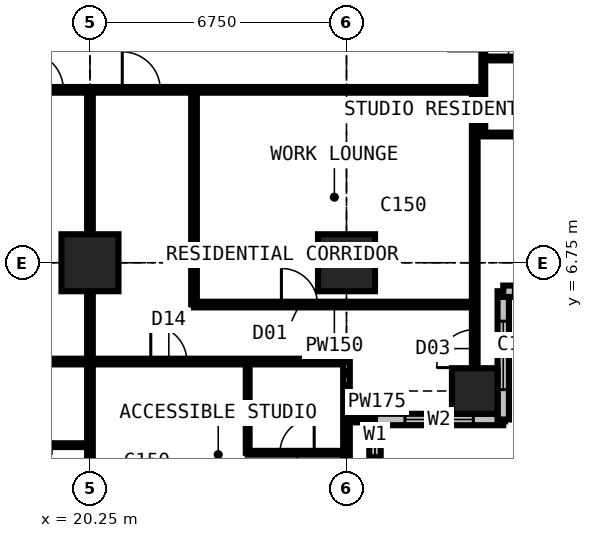
"""IFC4 building model, lengths in metres.
Left out: names, types, materials, properties, quantities, classifications, styles, units other than length and angle.
Written with IfcOpenShell. Run it as: python <this file> out.ifc"""

import sys

from ifc_helpers import new_model, si_unit, direction, frame, frame_2d, origin, origin_2d, place, context, subcontext, project, spatial, rectangle, extrude, element, fill, save


model = new_model("IFC4")
c1 = context("Model", 3, precision=1e-05, world=origin(), true_north=direction((0.0, 1.0)))
c2 = subcontext(c1, "Body", "Model", "MODEL_VIEW")
j1 = project(units=[si_unit("LENGTHUNIT", "METRE"), si_unit("PLANEANGLEUNIT", "RADIAN")], contexts=[c1])
p1 = place(None, origin())
s1 = spatial("IfcSite", under=j1, at=p1, CompositionType="ELEMENT")
p2 = place(p1, origin())
s2 = spatial("IfcBuilding", under=s1, at=p2, CompositionType="ELEMENT")
p3 = place(p2, frame((0.0, 0.0, 149.4)))
s3 = spatial("IfcBuildingStorey", under=s2, at=p3, CompositionType="ELEMENT", Elevation=149.4)
for number, where, z_axis, x_axis in (
    (1, (20.25, 6.75, 0.0), (0.0, 0.0, 1.0), (1.0, 0.0, 0.0)),
    (2, (27.0, 6.75, 0.0), (0.0, 0.0, 1.0), (1.0, 0.0, 0.0)),
):
    element("IfcColumn", number, at=place(p3, frame(where, z_axis=z_axis, x_axis=x_axis)), inside=s3, PredefinedType="COLUMN", context=c2, shape_type="SweptSolid", body=[
        extrude(rectangle(XDim=1.5, YDim=1.5, at=origin_2d()), origin(), (0.0, 0.0, 1.0), 3.6),
    ])
p4 = place(p3, frame((30.375, 3.375, 0.0), z_axis=(0.0, 0.0, 1.0), x_axis=(1.0, 0.0, 0.0)))
e3 = element("IfcColumn", 3, at=p4, inside=s3, PredefinedType="COLUMN", context=c2, shape_type="SweptSolid", body=[
    extrude(rectangle(XDim=1.2, YDim=1.2, at=origin_2d()), origin(), (0.0, 0.0, 1.0), 3.6),
])
p5 = place(p3, frame((27.75, -0.75, 0.0), z_axis=(0.0, 0.0, 1.0), x_axis=(0.0, 1.0, 0.0)))
e4 = element("IfcWall", 4, at=p5, inside=s3, PredefinedType="SOLIDWALL", context=c2, shape_type="SweptSolid", body=[
    extrude(rectangle(XDim=3.375, YDim=0.3, at=frame_2d((1.688, 0.0))), origin(), (0.0, 0.0, 1.0), 3.375),
])
p6 = place(p5, frame((1.607, 0.0, 0.9)))
e5 = element("IfcOpeningElement", 5, at=p6, cuts=e4, PredefinedType="OPENING", context=c2, shape_type="SweptSolid", body=[
    extrude(rectangle(XDim=1.5, YDim=1.8, at=frame_2d((0.75, 0.9))), frame((0.0, 0.16, 0.0), z_axis=(0.0, -1.0, 0.0), x_axis=(1.0, 0.0, 0.0)), (0.0, 0.0, 1.0), 0.32),
])
p7 = place(p3, frame((27.75, 2.625, 0.0), z_axis=(0.0, 0.0, 1.0), x_axis=(1.0, 0.0, 0.0)))
e6 = element("IfcWall", 6, at=p7, inside=s3, PredefinedType="SOLIDWALL", context=c2, shape_type="SweptSolid", body=[
    extrude(rectangle(XDim=3.375, YDim=0.3, at=frame_2d((1.688, 0.0))), origin(), (0.0, 0.0, 1.0), 3.375),
])
p8 = place(p7, frame((0.788, 0.0, 0.6)))
e7 = element("IfcOpeningElement", 7, at=p8, cuts=e6, PredefinedType="OPENING", context=c2, shape_type="SweptSolid", body=[
    extrude(rectangle(XDim=1.8, YDim=2.1, at=frame_2d((0.9, 1.05))), frame((0.0, 0.16, 0.0), z_axis=(0.0, -1.0, 0.0), x_axis=(1.0, 0.0, 0.0)), (0.0, 0.0, 1.0), 0.32),
])
p9 = place(p3, frame((31.125, 2.625, 0.0), z_axis=(0.0, 0.0, 1.0), x_axis=(0.0, 1.0, 0.0)))
e8 = element("IfcWall", 8, at=p9, inside=s3, PredefinedType="SOLIDWALL", context=c2, shape_type="SweptSolid", body=[
    extrude(rectangle(XDim=3.375, YDim=0.3, at=frame_2d((1.688, 0.0))), origin(), (0.0, 0.0, 1.0), 3.375),
])
p10 = place(p9, frame((0.788, 0.0, 0.6)))
e9 = element("IfcOpeningElement", 9, at=p10, cuts=e8, PredefinedType="OPENING", context=c2, shape_type="SweptSolid", body=[
    extrude(rectangle(XDim=1.8, YDim=2.1, at=frame_2d((0.9, 1.05))), frame((0.0, 0.16, 0.0), z_axis=(0.0, -1.0, 0.0), x_axis=(1.0, 0.0, 0.0)), (0.0, 0.0, 1.0), 0.32),
])
p11 = place(p3, frame((31.125, 6.0, 0.0), z_axis=(0.0, 0.0, 1.0), x_axis=(1.0, 0.0, 0.0)))
e10 = element("IfcWall", 10, at=p11, inside=s3, PredefinedType="SOLIDWALL", context=c2, shape_type="SweptSolid", body=[
    extrude(rectangle(XDim=3.375, YDim=0.3, at=frame_2d((1.688, 0.0))), origin(), (0.0, 0.0, 1.0), 3.375),
])
p12 = place(p11, frame((0.268, 0.0, 0.9)))
e11 = element("IfcOpeningElement", 11, at=p12, cuts=e10, PredefinedType="OPENING", context=c2, shape_type="SweptSolid", body=[
    extrude(rectangle(XDim=1.5, YDim=1.8, at=frame_2d((0.75, 0.9))), frame((0.0, 0.16, 0.0), z_axis=(0.0, -1.0, 0.0), x_axis=(1.0, 0.0, 0.0)), (0.0, 0.0, 1.0), 0.32),
])
p13 = place(p3, frame((6.75, 4.15, 0.0), z_axis=(0.0, 0.0, 1.0), x_axis=(1.0, 0.0, 0.0)))
e12 = element("IfcWall", 12, at=p13, inside=s3, PredefinedType="PARTITIONING", context=c2, shape_type="SweptSolid", body=[
    extrude(rectangle(XDim=20.25, YDim=0.15, at=frame_2d((10.125, 0.0))), origin(), (0.0, 0.0, 1.0), 3.375),
])
p14 = place(p13, frame((1.2, 0.0, 0.0)))
e13 = element("IfcOpeningElement", 13, at=p14, cuts=e12, PredefinedType="OPENING", context=c2, shape_type="SweptSolid", body=[
    extrude(rectangle(XDim=1.0, YDim=2.2, at=frame_2d((0.5, 1.1))), frame((0.0, 0.085, 0.0), z_axis=(0.0, -1.0, 0.0), x_axis=(1.0, 0.0, 0.0)), (0.0, 0.0, 1.0), 0.17),
])
p15 = place(p13, frame((3.575, 0.0, 0.0)))
e14 = element("IfcOpeningElement", 14, at=p15, cuts=e12, PredefinedType="OPENING", context=c2, shape_type="SweptSolid", body=[
    extrude(rectangle(XDim=0.95, YDim=2.2, at=frame_2d((0.475, 1.1))), frame((0.0, 0.085, 0.0), z_axis=(0.0, -1.0, 0.0), x_axis=(1.0, 0.0, 0.0)), (0.0, 0.0, 1.0), 0.17),
])
p16 = place(p13, frame((7.0, 0.0, 0.0)))
e15 = element("IfcOpeningElement", 15, at=p16, cuts=e12, PredefinedType="OPENING", context=c2, shape_type="SweptSolid", body=[
    extrude(rectangle(XDim=0.95, YDim=2.2, at=frame_2d((0.475, 1.1))), frame((0.0, 0.085, 0.0), z_axis=(0.0, -1.0, 0.0), x_axis=(1.0, 0.0, 0.0)), (0.0, 0.0, 1.0), 0.17),
])
p17 = place(p13, frame((10.375, 0.0, 0.0)))
e16 = element("IfcOpeningElement", 16, at=p17, cuts=e12, PredefinedType="OPENING", context=c2, shape_type="SweptSolid", body=[
    extrude(rectangle(XDim=0.95, YDim=2.2, at=frame_2d((0.475, 1.1))), frame((0.0, 0.085, 0.0), z_axis=(0.0, -1.0, 0.0), x_axis=(1.0, 0.0, 0.0)), (0.0, 0.0, 1.0), 0.17),
])
p18 = place(p13, frame((15.1, 0.0, 0.0)))
e17 = element("IfcOpeningElement", 17, at=p18, cuts=e12, PredefinedType="OPENING", context=c2, shape_type="SweptSolid", body=[
    extrude(rectangle(XDim=0.95, YDim=2.2, at=frame_2d((0.475, 1.1))), frame((0.0, 0.085, 0.0), z_axis=(0.0, -1.0, 0.0), x_axis=(1.0, 0.0, 0.0)), (0.0, 0.0, 1.0), 0.17),
])
p19 = place(p3, frame((10.125, 11.3, 0.0), z_axis=(0.0, 0.0, 1.0), x_axis=(1.0, 0.0, 0.0)))
e18 = element("IfcWall", 18, at=p19, inside=s3, PredefinedType="PARTITIONING", context=c2, shape_type="SweptSolid", body=[
    extrude(rectangle(XDim=20.475, YDim=0.15, at=frame_2d((10.238, 0.0))), origin(), (0.0, 0.0, 1.0), 3.375),
])
p20 = place(p19, frame((8.425, 0.0, 0.0)))
e19 = element("IfcOpeningElement", 19, at=p20, cuts=e18, PredefinedType="OPENING", context=c2, shape_type="SweptSolid", body=[
    extrude(rectangle(XDim=1.0, YDim=2.2, at=frame_2d((0.5, 1.1))), frame((0.0, 0.085, 0.0), z_axis=(0.0, -1.0, 0.0), x_axis=(1.0, 0.0, 0.0)), (0.0, 0.0, 1.0), 0.17),
])
p21 = place(p19, frame((10.975, 0.0, 0.0)))
e20 = element("IfcOpeningElement", 20, at=p21, cuts=e18, PredefinedType="OPENING", context=c2, shape_type="SweptSolid", body=[
    extrude(rectangle(XDim=1.0, YDim=2.2, at=frame_2d((0.5, 1.1))), frame((0.0, 0.085, 0.0), z_axis=(0.0, -1.0, 0.0), x_axis=(1.0, 0.0, 0.0)), (0.0, 0.0, 1.0), 0.17),
])
p22 = place(p19, frame((4.875, 0.0, 0.0)))
e21 = element("IfcOpeningElement", 21, at=p22, cuts=e18, PredefinedType="OPENING", context=c2, shape_type="SweptSolid", body=[
    extrude(rectangle(XDim=0.95, YDim=2.2, at=frame_2d((0.475, 1.1))), frame((0.0, 0.085, 0.0), z_axis=(0.0, -1.0, 0.0), x_axis=(1.0, 0.0, 0.0)), (0.0, 0.0, 1.0), 0.17),
])
p23 = place(p3, frame((18.25, 1.95, 0.0), z_axis=(0.0, 0.0, 1.0), x_axis=(1.0, 0.0, 0.0)))
e22 = element("IfcWall", 22, at=p23, inside=s3, PredefinedType="PARTITIONING", context=c2, shape_type="SweptSolid", body=[
    extrude(rectangle(XDim=2.0, YDim=0.1, at=frame_2d((1.0, 0.0))), origin(), (0.0, 0.0, 1.0), 3.375),
])
p24 = place(p3, frame((20.25, -0.734, 0.0), z_axis=(0.0, 0.0, 1.0), x_axis=(0.0, 1.0, 0.0)))
e23 = element("IfcWall", 23, at=p24, inside=s3, PredefinedType="PARTITIONING", context=c2, shape_type="SweptSolid", body=[
    extrude(rectangle(XDim=12.034, YDim=0.15, at=frame_2d((6.017, 0.0))), origin(), (0.0, 0.0, 1.0), 2.806),
])
p25 = place(p3, frame((22.988, 5.65, 0.0), z_axis=(0.0, 0.0, 1.0), x_axis=(1.0, 0.0, 0.0)))
e24 = element("IfcWall", 24, at=p25, inside=s3, PredefinedType="PARTITIONING", context=c2, shape_type="SweptSolid", body=[
    extrude(rectangle(XDim=7.387, YDim=0.15, at=frame_2d((3.694, 0.0))), origin(), (0.0, 0.0, 1.0), 3.375),
])
p26 = place(p25, frame((2.3, 0.0, 0.0)))
e25 = element("IfcOpeningElement", 25, at=p26, cuts=e24, PredefinedType="OPENING", context=c2, shape_type="SweptSolid", body=[
    extrude(rectangle(XDim=0.95, YDim=2.2, at=frame_2d((0.475, 1.1))), frame((0.0, 0.085, 0.0), z_axis=(0.0, -1.0, 0.0), x_axis=(1.0, 0.0, 0.0)), (0.0, 0.0, 1.0), 0.17),
])
p27 = place(p3, frame((22.988, 5.65, 0.0), z_axis=(0.0, 0.0, 1.0), x_axis=(0.0, 1.0, 0.0)))
e26 = element("IfcWall", 26, at=p27, inside=s3, PredefinedType="PARTITIONING", context=c2, shape_type="SweptSolid", body=[
    extrude(rectangle(XDim=5.65, YDim=0.15, at=frame_2d((2.825, 0.0))), origin(), (0.0, 0.0, 1.0), 3.375),
])
p28 = place(p3, frame((24.4, 1.75, 0.0), z_axis=(0.0, 0.0, 1.0), x_axis=(0.0, 1.0, 0.0)))
e27 = element("IfcWall", 27, at=p28, inside=s3, PredefinedType="PARTITIONING", context=c2, shape_type="SweptSolid", body=[
    extrude(rectangle(XDim=2.4, YDim=0.1, at=frame_2d((1.2, 0.0))), origin(), (0.0, 0.0, 1.0), 3.375),
])
p29 = place(p3, frame((24.4, 1.75, 0.0), z_axis=(0.0, 0.0, 1.0), x_axis=(1.0, 0.0, 0.0)))
e28 = element("IfcWall", 28, at=p29, inside=s3, PredefinedType="PARTITIONING", context=c2, shape_type="SweptSolid", body=[
    extrude(rectangle(XDim=2.6, YDim=0.1, at=frame_2d((1.3, 0.0))), origin(), (0.0, 0.0, 1.0), 3.375),
])
p30 = place(p29, frame((0.85, 0.0, 0.0)))
e29 = element("IfcOpeningElement", 29, at=p30, cuts=e28, PredefinedType="OPENING", context=c2, shape_type="SweptSolid", body=[
    extrude(rectangle(XDim=0.9, YDim=2.2, at=frame_2d((0.45, 1.1))), frame((0.0, 0.06, 0.0), z_axis=(0.0, -1.0, 0.0), x_axis=(1.0, 0.0, 0.0)), (0.0, 0.0, 1.0), 0.12),
])
p31 = place(p3, frame((27.0, -0.734, 0.0), z_axis=(0.0, 0.0, 1.0), x_axis=(0.0, 1.0, 0.0)))
e30 = element("IfcWall", 30, at=p31, inside=s3, PredefinedType="PARTITIONING", context=c2, shape_type="SweptSolid", body=[
    extrude(rectangle(XDim=4.884, YDim=0.175, at=frame_2d((2.442, 0.0))), origin(), (0.0, 0.0, 1.0), 2.877),
])
p32 = place(p3, frame((27.0, 2.625, 0.0), z_axis=(0.0, 0.0, 1.0), x_axis=(1.0, 0.0, 0.0)))
e31 = element("IfcWall", 31, at=p32, inside=s3, PredefinedType="PARTITIONING", context=c2, shape_type="SweptSolid", body=[
    extrude(rectangle(XDim=0.734, YDim=0.15, at=frame_2d((0.367, 0.0))), origin(), (0.0, 0.0, 1.0), 3.375),
])
p33 = place(p3, frame((30.375, 2.775, 0.0), z_axis=(0.0, 0.0, 1.0), x_axis=(0.0, 1.0, 0.0)))
e32 = element("IfcWall", 32, at=p33, inside=s3, PredefinedType="PARTITIONING", context=c2, shape_type="SweptSolid", body=[
    extrude(rectangle(XDim=8.525, YDim=0.15, at=frame_2d((4.263, 0.0))), origin(), (0.0, 0.0, 1.0), 2.877),
])
p34 = place(p33, frame((1.216, 0.0, 0.0)))
e33 = element("IfcOpeningElement", 33, at=p34, cuts=e32, PredefinedType="OPENING", context=c2, shape_type="SweptSolid", body=[
    extrude(rectangle(XDim=1.0, YDim=2.2, at=frame_2d((0.5, 1.1))), frame((0.0, 0.085, 0.0), z_axis=(0.0, -1.0, 0.0), x_axis=(1.0, 0.0, 0.0)), (0.0, 0.0, 1.0), 0.17),
])
p35 = place(p3, frame((30.6, 10.125, 0.0), z_axis=(0.0, 0.0, 1.0), x_axis=(0.0, 1.0, 0.0)))
e34 = element("IfcWall", 34, at=p35, inside=s3, PredefinedType="PARTITIONING", context=c2, shape_type="SweptSolid", body=[
    extrude(rectangle(XDim=3.375, YDim=0.1, at=frame_2d((1.688, 0.0))), origin(), (0.0, 0.0, 1.0), 3.375),
])
p36 = place(p35, frame((2.2, 0.0, 0.0)))
e35 = element("IfcOpeningElement", 35, at=p36, cuts=e34, PredefinedType="OPENING", context=c2, shape_type="SweptSolid", body=[
    extrude(rectangle(XDim=0.95, YDim=2.2, at=frame_2d((0.475, 1.1))), frame((0.0, 0.06, 0.0), z_axis=(0.0, -1.0, 0.0), x_axis=(1.0, 0.0, 0.0)), (0.0, 0.0, 1.0), 0.12),
])
p37 = place(p3, frame((30.6, 10.125, 0.0), z_axis=(0.0, 0.0, 1.0), x_axis=(1.0, 0.0, 0.0)))
e36 = element("IfcWall", 36, at=p37, inside=s3, PredefinedType="PARTITIONING", context=c2, shape_type="SweptSolid", body=[
    extrude(rectangle(XDim=3.884, YDim=0.1, at=frame_2d((1.942, 0.0))), origin(), (0.0, 0.0, 1.0), 3.375),
])
p38 = place(p3, frame((30.6, 12.125, 0.0), z_axis=(0.0, 0.0, 1.0), x_axis=(1.0, 0.0, 0.0)))
e37 = element("IfcWall", 37, at=p38, inside=s3, PredefinedType="PARTITIONING", context=c2, shape_type="SweptSolid", body=[
    extrude(rectangle(XDim=2.2, YDim=0.1, at=frame_2d((1.1, 0.0))), origin(), (0.0, 0.0, 1.0), 3.375),
])
p39 = place(p38, frame((0.65, 0.0, 0.0)))
e38 = element("IfcOpeningElement", 38, at=p39, cuts=e37, PredefinedType="OPENING", context=c2, shape_type="SweptSolid", body=[
    extrude(rectangle(XDim=0.9, YDim=2.2, at=frame_2d((0.45, 1.1))), frame((0.0, 0.06, 0.0), z_axis=(0.0, -1.0, 0.0), x_axis=(1.0, 0.0, 0.0)), (0.0, 0.0, 1.0), 0.12),
])
p40 = place(p6, origin())
e39 = element("IfcWindow", 39, at=p40, inside=s3, PartitioningType="SINGLE_PANEL", PredefinedType="WINDOW", context=c2, shape_type="SweptSolid", body=[
    extrude(rectangle(XDim=1.5, YDim=1.8, at=frame_2d((0.75, 0.9))), frame((0.0, 0.03, 0.0), z_axis=(0.0, -1.0, 0.0), x_axis=(1.0, 0.0, 0.0)), (0.0, 0.0, 1.0), 0.06),
])
fill(e5, e39)
p41 = place(p8, origin())
e40 = element("IfcWindow", 40, at=p41, inside=s3, PartitioningType="SINGLE_PANEL", PredefinedType="WINDOW", context=c2, shape_type="SweptSolid", body=[
    extrude(rectangle(XDim=1.8, YDim=2.1, at=frame_2d((0.9, 1.05))), frame((0.0, 0.03, 0.0), z_axis=(0.0, -1.0, 0.0), x_axis=(1.0, 0.0, 0.0)), (0.0, 0.0, 1.0), 0.06),
])
fill(e7, e40)
p42 = place(p10, origin())
e41 = element("IfcWindow", 41, at=p42, inside=s3, PartitioningType="SINGLE_PANEL", PredefinedType="WINDOW", context=c2, shape_type="SweptSolid", body=[
    extrude(rectangle(XDim=1.8, YDim=2.1, at=frame_2d((0.9, 1.05))), frame((0.0, 0.03, 0.0), z_axis=(0.0, -1.0, 0.0), x_axis=(1.0, 0.0, 0.0)), (0.0, 0.0, 1.0), 0.06),
])
fill(e9, e41)
p43 = place(p20, origin())
e42 = element("IfcDoor", 42, at=p43, inside=s3, OperationType="SINGLE_SWING_LEFT", PredefinedType="DOOR", context=c2, shape_type="SweptSolid", body=[
    extrude(rectangle(XDim=1.0, YDim=2.2, at=frame_2d((0.5, 1.1))), frame((0.0, 0.025, 0.0), z_axis=(0.0, -1.0, 0.0), x_axis=(1.0, 0.0, 0.0)), (0.0, 0.0, 1.0), 0.05),
])
fill(e19, e42)
p44 = place(p18, origin())
e43 = element("IfcDoor", 43, at=p44, inside=s3, OperationType="SINGLE_SWING_LEFT", PredefinedType="DOOR", context=c2, shape_type="SweptSolid", body=[
    extrude(rectangle(XDim=0.95, YDim=2.2, at=frame_2d((0.475, 1.1))), frame((0.0, 0.025, 0.0), z_axis=(0.0, -1.0, 0.0), x_axis=(1.0, 0.0, 0.0)), (0.0, 0.0, 1.0), 0.05),
])
fill(e17, e43)
p45 = place(p30, origin())
e44 = element("IfcDoor", 44, at=p45, inside=s3, OperationType="SINGLE_SWING_RIGHT", PredefinedType="DOOR", context=c2, shape_type="SweptSolid", body=[
    extrude(rectangle(XDim=0.9, YDim=2.2, at=frame_2d((0.45, 1.1))), frame((0.0, 0.025, 0.0), z_axis=(0.0, -1.0, 0.0), x_axis=(1.0, 0.0, 0.0)), (0.0, 0.0, 1.0), 0.05),
])
fill(e29, e44)
p46 = place(p21, origin())
e45 = element("IfcDoor", 45, at=p46, inside=s3, OperationType="SINGLE_SWING_LEFT", PredefinedType="DOOR", context=c2, shape_type="SweptSolid", body=[
    extrude(rectangle(XDim=1.0, YDim=2.2, at=frame_2d((0.5, 1.1))), frame((0.0, 0.025, 0.0), z_axis=(0.0, -1.0, 0.0), x_axis=(1.0, 0.0, 0.0)), (0.0, 0.0, 1.0), 0.05),
])
fill(e20, e45)
p47 = place(p26, origin())
e46 = element("IfcDoor", 46, at=p47, inside=s3, OperationType="SINGLE_SWING_LEFT", PredefinedType="DOOR", context=c2, shape_type="SweptSolid", body=[
    extrude(rectangle(XDim=0.95, YDim=2.2, at=frame_2d((0.475, 1.1))), frame((0.0, 0.025, 0.0), z_axis=(0.0, -1.0, 0.0), x_axis=(1.0, 0.0, 0.0)), (0.0, 0.0, 1.0), 0.05),
])
fill(e25, e46)
p48 = place(p34, origin())
e47 = element("IfcDoor", 47, at=p48, inside=s3, OperationType="SINGLE_SWING_LEFT", PredefinedType="DOOR", context=c2, shape_type="SweptSolid", body=[
    extrude(rectangle(XDim=1.0, YDim=2.2, at=frame_2d((0.5, 1.1))), frame((0.0, 0.025, 0.0), z_axis=(0.0, -1.0, 0.0), x_axis=(1.0, 0.0, 0.0)), (0.0, 0.0, 1.0), 0.05),
])
fill(e33, e47)
p49 = place(p39, origin())
e48 = element("IfcDoor", 48, at=p49, inside=s3, OperationType="SINGLE_SWING_RIGHT", PredefinedType="DOOR", context=c2, shape_type="SweptSolid", body=[
    extrude(rectangle(XDim=0.9, YDim=2.2, at=frame_2d((0.45, 1.1))), frame((0.0, 0.025, 0.0), z_axis=(0.0, -1.0, 0.0), x_axis=(1.0, 0.0, 0.0)), (0.0, 0.0, 1.0), 0.05),
])
fill(e38, e48)
save(model, sys.argv[1])
